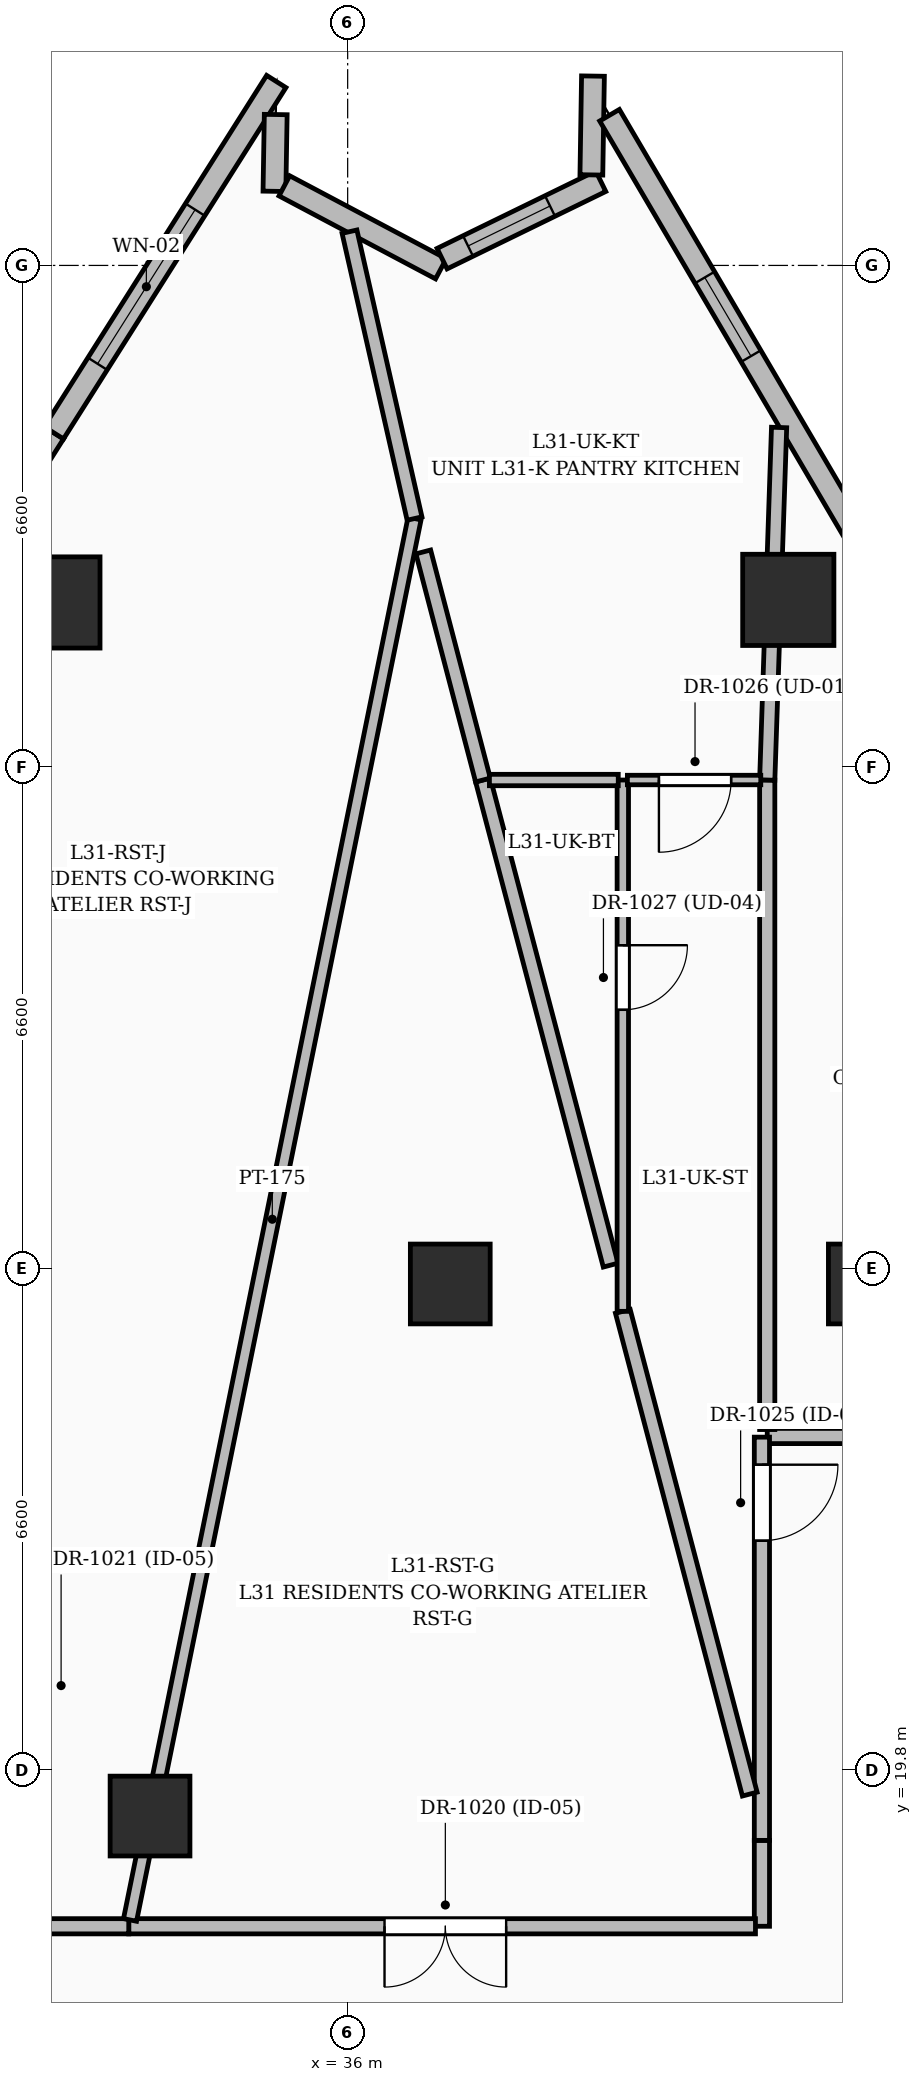
"""IFC4 building model, lengths in metres.
Left out: names, types, materials, properties, quantities, classifications, styles, units other than length and angle.
Written with IfcOpenShell. Run it as: python <this file> out.ifc"""

import sys

from ifc_helpers import new_model, si_unit, direction, frame, frame_2d, origin, origin_2d, place, context, subcontext, project, spatial, rectangle, extrude, element, fill, save


model = new_model("IFC4")
c1 = context("Model", 3, precision=1e-05, world=origin(), true_north=direction((0.0, 1.0)))
c2 = subcontext(c1, "Body", "Model", "MODEL_VIEW")
j1 = project(units=[si_unit("LENGTHUNIT", "METRE"), si_unit("PLANEANGLEUNIT", "RADIAN")], contexts=[c1])
p1 = place(None, origin())
s1 = spatial("IfcSite", under=j1, at=p1, CompositionType="ELEMENT")
p2 = place(p1, origin())
s2 = spatial("IfcBuilding", under=s1, at=p2, CompositionType="ELEMENT")
p3 = place(p2, frame((0.0, 0.0, 124.8)))
s3 = spatial("IfcBuildingStorey", under=s2, at=p3, CompositionType="ELEMENT", Elevation=124.8)
for number, where, z_axis, x_axis in (
    (1, (42.85, 26.2, 0.0), (0.0, 0.0, 1.0), (1.0, 0.0, 0.0)),
    (2, (37.35, 26.2, 0.0), (0.0, 0.0, 1.0), (1.0, 0.0, 0.0)),
    (3, (33.4, 19.2, 0.0), (0.0, 0.0, 1.0), (1.0, 0.0, 0.0)),
):
    element("IfcColumn", number, at=place(p3, frame(where, z_axis=z_axis, x_axis=x_axis)), inside=s3, PredefinedType="COLUMN", context=c2, shape_type="SweptSolid", body=[
        extrude(rectangle(XDim=1.05, YDim=1.05, at=origin_2d()), origin(), (0.0, 0.0, 1.0), 3.6),
    ])
for number, where, z_axis, x_axis in (
    (4, (41.797, 35.2, 0.0), (0.0, 0.0, 1.0), (1.0, 0.0, 0.0)),
    (5, (32.142, 35.166, 0.0), (0.0, 0.0, 1.0), (1.0, 0.0, 0.0)),
):
    element("IfcColumn", number, at=place(p3, frame(where, z_axis=z_axis, x_axis=x_axis)), inside=s3, PredefinedType="COLUMN", context=c2, shape_type="SweptSolid", body=[
        extrude(rectangle(XDim=1.2, YDim=1.2, at=origin_2d()), origin(), (0.0, 0.0, 1.0), 3.6),
    ])
p4 = place(p3, frame((29.208, 32.775, 0.0), z_axis=(0.0, 0.0, 1.0), x_axis=(0.534927859629, 0.844897736411, 0.0)))
e6 = element("IfcWall", 6, at=p4, inside=s3, PredefinedType="SOLIDWALL", context=c2, shape_type="SweptSolid", body=[
    extrude(rectangle(XDim=5.471, YDim=0.3, at=frame_2d((2.735, 0.0))), origin(), (0.0, 0.0, 1.0), 3.35),
])
p5 = place(p4, frame((2.175, 0.0, 0.8)))
e7 = element("IfcOpeningElement", 7, at=p5, cuts=e6, PredefinedType="OPENING", context=c2, shape_type="SweptSolid", body=[
    extrude(rectangle(XDim=1.2, YDim=1.8, at=frame_2d((0.6, 0.9))), frame((0.0, 0.16, 0.0), z_axis=(0.0, -1.0, 0.0), x_axis=(1.0, 0.0, 0.0)), (0.0, 0.0, 1.0), 0.32),
])
p6 = place(p3, frame((32.135, 37.398, 0.0), z_axis=(0.0, 0.0, 1.0), x_axis=(0.534896002359, 0.844917905278, 0.0)))
e8 = element("IfcWall", 8, at=p6, inside=s3, PredefinedType="SOLIDWALL", context=c2, shape_type="SweptSolid", body=[
    extrude(rectangle(XDim=5.471, YDim=0.3, at=frame_2d((2.735, 0.0))), origin(), (0.0, 0.0, 1.0), 3.35),
])
p7 = place(p6, frame((1.075, 0.0, 0.6)))
e9 = element("IfcOpeningElement", 9, at=p7, cuts=e8, PredefinedType="OPENING", context=c2, shape_type="SweptSolid", body=[
    extrude(rectangle(XDim=2.4, YDim=2.1, at=frame_2d((1.2, 1.05))), frame((0.0, 0.16, 0.0), z_axis=(0.0, -1.0, 0.0), x_axis=(1.0, 0.0, 0.0)), (0.0, 0.0, 1.0), 0.32),
])
p8 = place(p3, frame((35.054, 41.585, 0.0), z_axis=(0.0, 0.0, 1.0), x_axis=(-0.016913964816, -0.999856948665, 0.0)))
e10 = element("IfcWall", 10, at=p8, inside=s3, PredefinedType="SOLIDWALL", context=c2, shape_type="SweptSolid", body=[
    extrude(rectangle(XDim=1.01, YDim=0.3, at=frame_2d((0.505, 0.0))), origin(), (0.0, 0.0, 1.0), 3.35),
])
p9 = place(p3, frame((35.167, 40.647, 0.0), z_axis=(0.0, 0.0, 1.0), x_axis=(0.883555999994, -0.468325522339, 0.0)))
e11 = element("IfcWall", 11, at=p9, inside=s3, PredefinedType="SOLIDWALL", context=c2, shape_type="SweptSolid", body=[
    extrude(rectangle(XDim=2.331, YDim=0.3, at=frame_2d((1.166, 0.0))), origin(), (0.0, 0.0, 1.0), 3.35),
])
p10 = place(p3, frame((37.242, 39.689, 0.0), z_axis=(0.0, 0.0, 1.0), x_axis=(0.898736119344, 0.438489894738, 0.0)))
e12 = element("IfcWall", 12, at=p10, inside=s3, PredefinedType="SOLIDWALL", context=c2, shape_type="SweptSolid", body=[
    extrude(rectangle(XDim=2.323, YDim=0.3, at=frame_2d((1.161, 0.0))), origin(), (0.0, 0.0, 1.0), 3.35),
])
p11 = place(p10, frame((0.38, 0.0, 0.8)))
e13 = element("IfcOpeningElement", 13, at=p11, cuts=e12, PredefinedType="OPENING", context=c2, shape_type="SweptSolid", body=[
    extrude(rectangle(XDim=1.2, YDim=1.8, at=frame_2d((0.6, 0.9))), frame((0.0, 0.16, 0.0), z_axis=(0.0, -1.0, 0.0), x_axis=(1.0, 0.0, 0.0)), (0.0, 0.0, 1.0), 0.32),
])
p12 = place(p3, frame((39.206, 40.791, 0.0), z_axis=(0.0, 0.0, 1.0), x_axis=(0.01614812892, 0.999869610465, 0.0)))
e14 = element("IfcWall", 14, at=p12, inside=s3, PredefinedType="SOLIDWALL", context=c2, shape_type="SweptSolid", body=[
    extrude(rectangle(XDim=1.3, YDim=0.3, at=frame_2d((0.65, 0.0))), origin(), (0.0, 0.0, 1.0), 3.35),
])
p13 = place(p3, frame((39.445, 41.576, 0.0), z_axis=(0.0, 0.0, 1.0), x_axis=(0.50633152399, -0.862338905428, 0.0)))
e15 = element("IfcWall", 15, at=p13, inside=s3, PredefinedType="SOLIDWALL", context=c2, shape_type="SweptSolid", body=[
    extrude(rectangle(XDim=7.114, YDim=0.3, at=frame_2d((3.557, 0.0))), origin(), (0.0, 0.0, 1.0), 3.35),
])
p14 = place(p13, frame((2.475, 0.0, 0.8)))
e16 = element("IfcOpeningElement", 16, at=p14, cuts=e15, PredefinedType="OPENING", context=c2, shape_type="SweptSolid", body=[
    extrude(rectangle(XDim=1.2, YDim=1.8, at=frame_2d((0.6, 0.9))), frame((0.0, 0.16, 0.0), z_axis=(0.0, -1.0, 0.0), x_axis=(1.0, 0.0, 0.0)), (0.0, 0.0, 1.0), 0.32),
])
p15 = place(p3, frame((41.45, 18.88, 0.0), z_axis=(0.0, 0.0, 1.0), x_axis=(0.0, -1.0, 0.0)))
e17 = element("IfcWall", 17, at=p15, inside=s3, PredefinedType="PARTITIONING", context=c2, shape_type="SweptSolid", body=[
    extrude(rectangle(XDim=1.13, YDim=0.2, at=frame_2d((0.565, 0.0))), origin(), (0.0, 0.0, 1.0), 3.35),
])
p16 = place(p3, frame((41.365, 17.75, 0.0), z_axis=(0.0, 0.0, 1.0), x_axis=(-1.0, 0.0, 0.0)))
e18 = element("IfcWall", 18, at=p16, inside=s3, PredefinedType="PARTITIONING", context=c2, shape_type="SweptSolid", body=[
    extrude(rectangle(XDim=8.245, YDim=0.2, at=frame_2d((4.123, 0.0))), origin(), (0.0, 0.0, 1.0), 2.436),
])
p17 = place(p16, frame((3.28, 0.0, 0.0)))
e19 = element("IfcOpeningElement", 19, at=p17, cuts=e18, PredefinedType="OPENING", context=c2, shape_type="SweptSolid", body=[
    extrude(rectangle(XDim=1.6, YDim=2.3, at=frame_2d((0.8, 1.15))), frame((0.0, 0.11, 0.0), z_axis=(0.0, -1.0, 0.0), x_axis=(1.0, 0.0, 0.0)), (0.0, 0.0, 1.0), 0.22),
])
p18 = place(p3, frame((43.915, 24.2, 0.0), z_axis=(0.0, 0.0, 1.0), x_axis=(-1.0, 0.0, 0.0)))
e20 = element("IfcWall", 20, at=p18, inside=s3, PredefinedType="PARTITIONING", context=c2, shape_type="SweptSolid", body=[
    extrude(rectangle(XDim=2.395, YDim=0.2, at=frame_2d((1.198, 0.0))), origin(), (0.0, 0.0, 1.0), 2.436),
])
p19 = place(p3, frame((33.12, 17.75, 0.0), z_axis=(0.0, 0.0, 1.0), x_axis=(-1.0, 0.0, 0.0)))
e21 = element("IfcWall", 21, at=p19, inside=s3, PredefinedType="PARTITIONING", context=c2, shape_type="SweptSolid", body=[
    extrude(rectangle(XDim=1.17, YDim=0.2, at=frame_2d((0.585, 0.0))), origin(), (0.0, 0.0, 1.0), 3.35),
])
p20 = place(p3, frame((41.45, 24.185, 0.0), z_axis=(0.0, 0.0, 1.0), x_axis=(0.0, -1.0, 0.0)))
e22 = element("IfcWall", 22, at=p20, inside=s3, PredefinedType="PARTITIONING", context=c2, shape_type="SweptSolid", body=[
    extrude(rectangle(XDim=5.305, YDim=0.2, at=frame_2d((2.653, 0.0))), origin(), (0.0, 0.0, 1.0), 3.35),
])
p21 = place(p20, frame((0.363, 0.0, 0.0)))
e23 = element("IfcOpeningElement", 23, at=p21, cuts=e22, PredefinedType="OPENING", context=c2, shape_type="SweptSolid", body=[
    extrude(rectangle(XDim=1.0, YDim=2.2, at=frame_2d((0.5, 1.1))), frame((0.0, 0.11, 0.0), z_axis=(0.0, -1.0, 0.0), x_axis=(1.0, 0.0, 0.0)), (0.0, 0.0, 1.0), 0.22),
])
p22 = place(p3, frame((36.88, 36.27, 0.0), z_axis=(0.0, 0.0, 1.0), x_axis=(-0.198955349965, -0.980008555432, 0.0)))
e24 = element("IfcWall", 24, at=p22, inside=s3, PredefinedType="PARTITIONING", context=c2, shape_type="SweptSolid", body=[
    extrude(rectangle(XDim=18.813, YDim=0.175, at=frame_2d((9.406, 0.0))), origin(), (0.0, 0.0, 1.0), 2.372),
])
p23 = place(p3, frame((41.29, 19.489, 0.0), z_axis=(0.0, 0.0, 1.0), x_axis=(-0.254291997568, 0.967127488997, 0.0)))
e25 = element("IfcWall", 25, at=p23, inside=s3, PredefinedType="PARTITIONING", context=c2, shape_type="SweptSolid", body=[
    extrude(rectangle(XDim=6.567, YDim=0.2, at=frame_2d((3.283, 0.0))), origin(), (0.0, 0.0, 1.0), 3.35),
])
p24 = place(p3, frame((39.46, 26.448, 0.0), z_axis=(0.0, 0.0, 1.0), x_axis=(-0.254555210874, 0.967058242619, 0.0)))
e26 = element("IfcWall", 26, at=p24, inside=s3, PredefinedType="PARTITIONING", context=c2, shape_type="SweptSolid", body=[
    extrude(rectangle(XDim=6.599, YDim=0.2, at=frame_2d((3.3, 0.0))), origin(), (0.0, 0.0, 1.0), 2.436),
])
p25 = place(p3, frame((37.78, 32.83, 0.0), z_axis=(0.0, 0.0, 1.0), x_axis=(-0.253133149474, 0.967431449064, 0.0)))
e27 = element("IfcWall", 27, at=p25, inside=s3, PredefinedType="PARTITIONING", context=c2, shape_type="SweptSolid", body=[
    extrude(rectangle(XDim=3.102, YDim=0.2, at=frame_2d((1.551, 0.0))), origin(), (0.0, 0.0, 1.0), 2.57),
])
p26 = place(p3, frame((41.52, 24.285, 0.0), z_axis=(0.0, 0.0, 1.0), x_axis=(0.0, 1.0, 0.0)))
e28 = element("IfcWall", 28, at=p26, inside=s3, PredefinedType="PARTITIONING", context=c2, shape_type="SweptSolid", body=[
    extrude(rectangle(XDim=8.545, YDim=0.2, at=frame_2d((4.272, 0.0))), origin(), (0.0, 0.0, 1.0), 2.436),
])
p27 = place(p3, frame((41.676, 37.468, 0.0), z_axis=(0.0, 0.0, 1.0), x_axis=(-0.0336178771, -0.999434759421, 0.0)))
e29 = element("IfcWall", 29, at=p27, inside=s3, PredefinedType="PARTITIONING", context=c2, shape_type="SweptSolid", body=[
    extrude(rectangle(XDim=4.641, YDim=0.2, at=frame_2d((2.32, 0.0))), origin(), (0.0, 0.0, 1.0), 3.35),
])
p28 = place(p3, frame((36.88, 36.27, 0.0), z_axis=(0.0, 0.0, 1.0), x_axis=(-0.221190241938, 0.975230678799, 0.0)))
e30 = element("IfcWall", 30, at=p28, inside=s3, PredefinedType="PARTITIONING", context=c2, shape_type="SweptSolid", body=[
    extrude(rectangle(XDim=3.87, YDim=0.2, at=frame_2d((1.935, 0.0))), origin(), (0.0, 0.0, 1.0), 3.35),
])
p29 = place(p3, frame((39.62, 32.83, 0.0), z_axis=(0.0, 0.0, 1.0), x_axis=(0.0, -1.0, 0.0)))
e31 = element("IfcWall", 31, at=p29, inside=s3, PredefinedType="PARTITIONING", context=c2, shape_type="SweptSolid", body=[
    extrude(rectangle(XDim=6.99, YDim=0.15, at=frame_2d((3.495, 0.0))), origin(), (0.0, 0.0, 1.0), 2.436),
])
p30 = place(p29, frame((2.173, 0.0, 0.0)))
e32 = element("IfcOpeningElement", 32, at=p30, cuts=e31, PredefinedType="OPENING", context=c2, shape_type="SweptSolid", body=[
    extrude(rectangle(XDim=0.85, YDim=2.1, at=frame_2d((0.425, 1.05))), frame((0.0, 0.085, 0.0), z_axis=(0.0, -1.0, 0.0), x_axis=(1.0, 0.0, 0.0)), (0.0, 0.0, 1.0), 0.17),
])
p31 = place(p3, frame((41.435, 32.83, 0.0), z_axis=(0.0, 0.0, 1.0), x_axis=(-1.0, 0.0, 0.0)))
e33 = element("IfcWall", 33, at=p31, inside=s3, PredefinedType="PARTITIONING", context=c2, shape_type="SweptSolid", body=[
    extrude(rectangle(XDim=1.755, YDim=0.125, at=frame_2d((0.877, 0.0))), origin(), (0.0, 0.0, 1.0), 3.35),
])
p32 = place(p31, frame((0.39, 0.0, 0.0)))
e34 = element("IfcOpeningElement", 34, at=p32, cuts=e33, PredefinedType="OPENING", context=c2, shape_type="SweptSolid", body=[
    extrude(rectangle(XDim=0.95, YDim=2.2, at=frame_2d((0.475, 1.1))), frame((0.0, 0.072, 0.0), z_axis=(0.0, -1.0, 0.0), x_axis=(1.0, 0.0, 0.0)), (0.0, 0.0, 1.0), 0.145),
])
p33 = place(p3, frame((39.56, 32.83, 0.0), z_axis=(0.0, 0.0, 1.0), x_axis=(-1.0, 0.0, 0.0)))
e35 = element("IfcWall", 35, at=p33, inside=s3, PredefinedType="PARTITIONING", context=c2, shape_type="SweptSolid", body=[
    extrude(rectangle(XDim=1.695, YDim=0.15, at=frame_2d((0.848, 0.0))), origin(), (0.0, 0.0, 1.0), 3.35),
])
p34 = place(p7, origin())
e36 = element("IfcWindow", 36, at=p34, inside=s3, PartitioningType="SINGLE_PANEL", PredefinedType="WINDOW", context=c2, shape_type="SweptSolid", body=[
    extrude(rectangle(XDim=2.4, YDim=2.1, at=frame_2d((1.2, 1.05))), frame((0.0, 0.03, 0.0), z_axis=(0.0, -1.0, 0.0), x_axis=(1.0, 0.0, 0.0)), (0.0, 0.0, 1.0), 0.06),
])
fill(e9, e36)
p35 = place(p11, origin())
e37 = element("IfcWindow", 37, at=p35, inside=s3, PartitioningType="SINGLE_PANEL", PredefinedType="WINDOW", context=c2, shape_type="SweptSolid", body=[
    extrude(rectangle(XDim=1.2, YDim=1.8, at=frame_2d((0.6, 0.9))), frame((0.0, 0.03, 0.0), z_axis=(0.0, -1.0, 0.0), x_axis=(1.0, 0.0, 0.0)), (0.0, 0.0, 1.0), 0.06),
])
fill(e13, e37)
p36 = place(p14, origin())
e38 = element("IfcWindow", 38, at=p36, inside=s3, PartitioningType="SINGLE_PANEL", PredefinedType="WINDOW", context=c2, shape_type="SweptSolid", body=[
    extrude(rectangle(XDim=1.2, YDim=1.8, at=frame_2d((0.6, 0.9))), frame((0.0, 0.03, 0.0), z_axis=(0.0, -1.0, 0.0), x_axis=(1.0, 0.0, 0.0)), (0.0, 0.0, 1.0), 0.06),
])
fill(e16, e38)
p37 = place(p17, origin())
e39 = element("IfcDoor", 39, at=p37, inside=s3, OperationType="DOUBLE_DOOR_SINGLE_SWING", PredefinedType="DOOR", context=c2, shape_type="SweptSolid", body=[
    extrude(rectangle(XDim=1.6, YDim=2.3, at=frame_2d((0.8, 1.15))), frame((0.0, 0.025, 0.0), z_axis=(0.0, -1.0, 0.0), x_axis=(1.0, 0.0, 0.0)), (0.0, 0.0, 1.0), 0.05),
])
fill(e19, e39)
p38 = place(p21, origin())
e40 = element("IfcDoor", 40, at=p38, inside=s3, OperationType="SINGLE_SWING_LEFT", PredefinedType="DOOR", context=c2, shape_type="SweptSolid", body=[
    extrude(rectangle(XDim=1.0, YDim=2.2, at=frame_2d((0.5, 1.1))), frame((0.0, 0.025, 0.0), z_axis=(0.0, -1.0, 0.0), x_axis=(1.0, 0.0, 0.0)), (0.0, 0.0, 1.0), 0.05),
])
fill(e23, e40)
p39 = place(p32, origin())
e41 = element("IfcDoor", 41, at=p39, inside=s3, OperationType="SINGLE_SWING_RIGHT", PredefinedType="DOOR", context=c2, shape_type="SweptSolid", body=[
    extrude(rectangle(XDim=0.95, YDim=2.2, at=frame_2d((0.475, 1.1))), frame((0.0, 0.025, 0.0), z_axis=(0.0, -1.0, 0.0), x_axis=(1.0, 0.0, 0.0)), (0.0, 0.0, 1.0), 0.05),
])
fill(e34, e41)
p40 = place(p30, origin())
e42 = element("IfcDoor", 42, at=p40, inside=s3, OperationType="SINGLE_SWING_LEFT", PredefinedType="DOOR", context=c2, shape_type="SweptSolid", body=[
    extrude(rectangle(XDim=0.85, YDim=2.1, at=frame_2d((0.425, 1.05))), frame((0.0, 0.025, 0.0), z_axis=(0.0, -1.0, 0.0), x_axis=(1.0, 0.0, 0.0)), (0.0, 0.0, 1.0), 0.05),
])
fill(e32, e42)
save(model, sys.argv[1])
